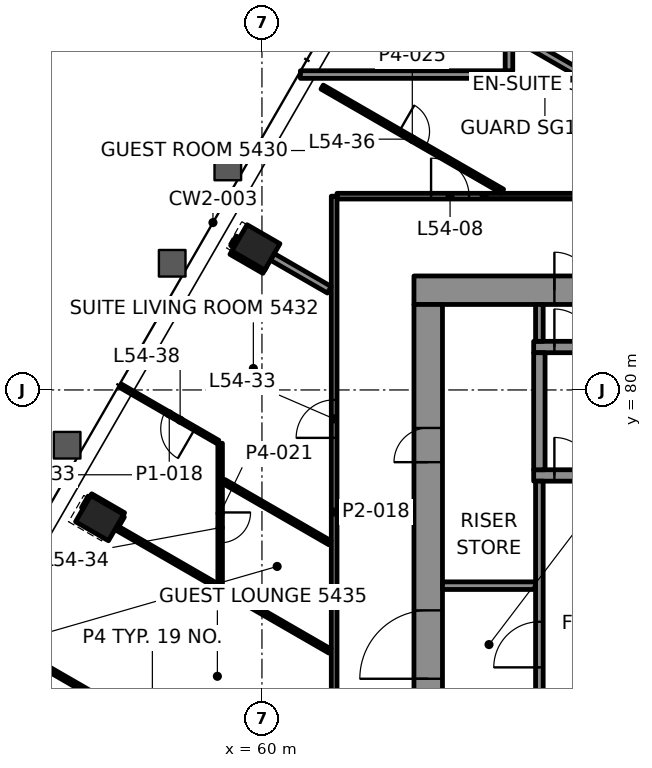
"""IFC4 building model, lengths in metres.
Left out: names, types, materials, properties, quantities, classifications, styles, units other than length and angle.
Written with IfcOpenShell. Run it as: python <this file> out.ifc"""

import sys

from ifc_helpers import new_model, si_unit, direction, frame, frame_2d, origin, origin_2d, place, context, subcontext, project, spatial, rectangle, hollow_rectangle, extrude, element, fill, save


model = new_model("IFC4")
c1 = context("Model", 3, precision=1e-05, world=origin(), true_north=direction((0.0, 1.0)))
c2 = subcontext(c1, "Body", "Model", "MODEL_VIEW")
j1 = project(units=[si_unit("LENGTHUNIT", "METRE"), si_unit("PLANEANGLEUNIT", "RADIAN")], contexts=[c1])
p1 = place(None, origin())
s1 = spatial("IfcSite", under=j1, at=p1, CompositionType="ELEMENT")
p2 = place(p1, origin())
s2 = spatial("IfcBuilding", under=s1, at=p2, CompositionType="ELEMENT")
p3 = place(p2, frame((0.0, 0.0, 229.9)))
s3 = spatial("IfcBuildingStorey", under=s2, at=p3, CompositionType="ELEMENT", Elevation=229.9)
for number, where, z_axis, x_axis in (
    (1, (59.841, 83.752, -0.0), (0.0, 0.0, 1.0), (-0.5, -0.866, 0.0)),
    (2, (55.728, 76.628, -0.0), (0.0, 0.0, 1.0), (-0.5, -0.866, 0.0)),
):
    element("IfcColumn", number, at=place(p3, frame(where, z_axis=z_axis, x_axis=x_axis)), inside=s3, PredefinedType="COLUMN", context=c2, shape_type="SweptSolid", body=[
        extrude(hollow_rectangle(XDim=0.8, YDim=1.0, WallThickness=0.05, at=origin_2d()), origin(), (0.0, 0.0, 1.0), 3.9),
    ])
p4 = place(p3, frame((64.0, 82.625, 0.0), z_axis=(0.0, 0.0, 1.0), x_axis=(1.0, 0.0, 0.0)))
e3 = element("IfcWall", 3, at=p4, inside=s3, PredefinedType="SHEAR", context=c2, shape_type="SweptSolid", body=[
    extrude(rectangle(XDim=22.0, YDim=0.75, at=frame_2d((11.0, 0.0))), origin(), (0.0, 0.0, 1.0), 3.7),
])
p5 = place(p4, frame((3.695, 0.0, 0.0)))
e4 = element("IfcOpeningElement", 4, at=p5, cuts=e3, PredefinedType="OPENING", context=c2, shape_type="SweptSolid", body=[
    extrude(rectangle(XDim=1.0, YDim=2.1, at=frame_2d((0.5, 1.05))), frame((0.0, 0.385, 0.0), z_axis=(0.0, -1.0, 0.0), x_axis=(1.0, 0.0, 0.0)), (0.0, 0.0, 1.0), 0.77),
])
p6 = place(p4, frame((17.505, 0.0, 0.0)))
e5 = element("IfcOpeningElement", 5, at=p6, cuts=e3, PredefinedType="OPENING", context=c2, shape_type="SweptSolid", body=[
    extrude(rectangle(XDim=1.0, YDim=2.1, at=frame_2d((0.5, 1.05))), frame((0.0, 0.385, 0.0), z_axis=(0.0, -1.0, 0.0), x_axis=(1.0, 0.0, 0.0)), (0.0, 0.0, 1.0), 0.77),
])
p7 = place(p4, frame((10.65, 0.0, 0.0)))
e6 = element("IfcOpeningElement", 6, at=p7, cuts=e3, PredefinedType="OPENING", context=c2, shape_type="SweptSolid", body=[
    extrude(rectangle(XDim=0.9, YDim=2.1, at=frame_2d((0.45, 1.05))), frame((0.0, 0.385, 0.0), z_axis=(0.0, -1.0, 0.0), x_axis=(1.0, 0.0, 0.0)), (0.0, 0.0, 1.0), 0.77),
])
p8 = place(p3, frame((64.375, 67.75, 0.0), z_axis=(0.0, 0.0, 1.0), x_axis=(0.0, 1.0, 0.0)))
e7 = element("IfcWall", 7, at=p8, inside=s3, PredefinedType="SHEAR", context=c2, shape_type="SweptSolid", body=[
    extrude(rectangle(XDim=14.5, YDim=0.75, at=frame_2d((7.25, 0.0))), origin(), (0.0, 0.0, 1.0), 3.7),
])
p9 = place(p8, frame((4.65, 0.0, 0.0)))
e8 = element("IfcOpeningElement", 8, at=p9, cuts=e7, PredefinedType="OPENING", context=c2, shape_type="SweptSolid", body=[
    extrude(rectangle(XDim=1.8, YDim=2.1, at=frame_2d((0.9, 1.05))), frame((0.0, 0.385, 0.0), z_axis=(0.0, -1.0, 0.0), x_axis=(1.0, 0.0, 0.0)), (0.0, 0.0, 1.0), 0.77),
])
p10 = place(p8, frame((2.55, 0.0, 0.0)))
e9 = element("IfcOpeningElement", 9, at=p10, cuts=e7, PredefinedType="OPENING", context=c2, shape_type="SweptSolid", body=[
    extrude(rectangle(XDim=0.9, YDim=2.1, at=frame_2d((0.45, 1.05))), frame((0.0, 0.385, 0.0), z_axis=(0.0, -1.0, 0.0), x_axis=(1.0, 0.0, 0.0)), (0.0, 0.0, 1.0), 0.77),
])
p11 = place(p8, frame((10.35, 0.0, 0.0)))
e10 = element("IfcOpeningElement", 10, at=p11, cuts=e7, PredefinedType="OPENING", context=c2, shape_type="SweptSolid", body=[
    extrude(rectangle(XDim=0.9, YDim=2.1, at=frame_2d((0.45, 1.05))), frame((0.0, 0.385, 0.0), z_axis=(0.0, -1.0, 0.0), x_axis=(1.0, 0.0, 0.0)), (0.0, 0.0, 1.0), 0.77),
])
p12 = place(p3, frame((67.15, 77.75, 0.0), z_axis=(0.0, 0.0, 1.0), x_axis=(1.0, 0.0, 0.0)))
e11 = element("IfcWall", 11, at=p12, inside=s3, PredefinedType="SHEAR", context=c2, shape_type="SweptSolid", body=[
    extrude(rectangle(XDim=17.45, YDim=0.3, at=frame_2d((8.725, 0.0))), origin(), (0.0, 0.0, 1.0), 3.7),
])
p13 = place(p12, frame((0.545, 0.0, 0.0)))
e12 = element("IfcOpeningElement", 12, at=p13, cuts=e11, PredefinedType="OPENING", context=c2, shape_type="SweptSolid", body=[
    extrude(rectangle(XDim=1.0, YDim=2.1, at=frame_2d((0.5, 1.05))), frame((0.0, 0.16, 0.0), z_axis=(0.0, -1.0, 0.0), x_axis=(1.0, 0.0, 0.0)), (0.0, 0.0, 1.0), 0.32),
])
p14 = place(p3, frame((67.15, 81.13, 0.0), z_axis=(0.0, 0.0, 1.0), x_axis=(1.0, 0.0, 0.0)))
e13 = element("IfcWall", 13, at=p14, inside=s3, PredefinedType="SHEAR", context=c2, shape_type="SweptSolid", body=[
    extrude(rectangle(XDim=6.91, YDim=0.3, at=frame_2d((3.455, 0.0))), origin(), (0.0, 0.0, 1.0), 3.7),
])
p15 = place(p14, frame((0.545, 0.0, 0.0)))
e14 = element("IfcOpeningElement", 14, at=p15, cuts=e13, PredefinedType="OPENING", context=c2, shape_type="SweptSolid", body=[
    extrude(rectangle(XDim=1.0, YDim=2.1, at=frame_2d((0.5, 1.05))), frame((0.0, 0.16, 0.0), z_axis=(0.0, -1.0, 0.0), x_axis=(1.0, 0.0, 0.0)), (0.0, 0.0, 1.0), 0.32),
])
p16 = place(p3, frame((67.3, 77.9, 0.0), z_axis=(0.0, 0.0, 1.0), x_axis=(0.0, 1.0, 0.0)))
e15 = element("IfcWall", 15, at=p16, inside=s3, PredefinedType="SHEAR", context=c2, shape_type="SweptSolid", body=[
    extrude(rectangle(XDim=3.08, YDim=0.3, at=frame_2d((1.54, 0.0))), origin(), (0.0, 0.0, 1.0), 3.7),
])
p17 = place(p3, frame((61.976, 85.1, 0.0), z_axis=(0.0, 0.0, 1.0), x_axis=(1.0, 0.0, 0.0)))
e16 = element("IfcWall", 16, at=p17, inside=s3, PredefinedType="PARTITIONING", context=c2, shape_type="SweptSolid", body=[
    extrude(rectangle(XDim=7.744, YDim=0.15, at=frame_2d((3.872, 0.0))), origin(), (0.0, 0.0, 1.0), 3.1),
])
p18 = place(p17, frame((2.475, 0.0, 0.0)))
e17 = element("IfcOpeningElement", 17, at=p18, cuts=e16, PredefinedType="OPENING", context=c2, shape_type="SweptSolid", body=[
    extrude(rectangle(XDim=1.0, YDim=2.1, at=frame_2d((0.5, 1.05))), frame((0.0, 0.085, 0.0), z_axis=(0.0, -1.0, 0.0), x_axis=(1.0, 0.0, 0.0)), (0.0, 0.0, 1.0), 0.17),
])
p19 = place(p3, frame((61.012, 88.3, 0.0), z_axis=(0.0, 0.0, 1.0), x_axis=(1.0, 0.0, 0.0)))
e18 = element("IfcWall", 18, at=p19, inside=s3, PredefinedType="PARTITIONING", context=c2, shape_type="SweptSolid", body=[
    extrude(rectangle(XDim=5.488, YDim=0.2, at=frame_2d((2.744, 0.0))), origin(), (0.0, 0.0, 1.0), 3.022),
])
p20 = place(p3, frame((56.192, 76.431, 0.0), z_axis=(0.0, 0.0, 1.0), x_axis=(0.500136839105, 0.865946385275, 0.0)))
e19 = element("IfcWall", 19, at=p20, inside=s3, PredefinedType="PARTITIONING", context=c2, shape_type="SweptSolid", body=[
    extrude(rectangle(XDim=0.289, YDim=0.1, at=frame_2d((0.145, 0.0))), origin(), (0.0, 0.0, 1.0), 3.1),
])
p21 = place(p3, frame((55.296, 76.879, 0.0), z_axis=(0.0, 0.0, 1.0), x_axis=(0.500126092966, 0.865952591736, 0.0)))
e20 = element("IfcWall", 20, at=p21, inside=s3, PredefinedType="PARTITIONING", context=c2, shape_type="SweptSolid", body=[
    extrude(rectangle(XDim=0.349, YDim=0.1, at=frame_2d((0.175, 0.0))), origin(), (0.0, 0.0, 1.0), 3.1),
])
p22 = place(p3, frame((59.263, 83.751, 0.0), z_axis=(0.0, 0.0, 1.0), x_axis=(0.499941024108, 0.866059450854, 0.0)))
e21 = element("IfcWall", 21, at=p22, inside=s3, PredefinedType="PARTITIONING", context=c2, shape_type="SweptSolid", body=[
    extrude(rectangle(XDim=0.29, YDim=0.2, at=frame_2d((0.145, 0.0))), origin(), (0.0, 0.0, 1.0), 3.1),
])
p23 = place(p3, frame((66.5, 88.4, 0.0), z_axis=(0.0, 0.0, 1.0), x_axis=(0.0, 1.0, 0.0)))
e22 = element("IfcWall", 22, at=p23, inside=s3, PredefinedType="PARTITIONING", context=c2, shape_type="SweptSolid", body=[
    extrude(rectangle(XDim=0.83, YDim=0.2, at=frame_2d((0.415, 0.0))), origin(), (0.0, 0.0, 1.0), 3.1),
])
p24 = place(p3, frame((61.9, 68.476, 0.0), z_axis=(0.0, 0.0, 1.0), x_axis=(0.0, 1.0, 0.0)))
e23 = element("IfcWall", 23, at=p24, inside=s3, PredefinedType="PARTITIONING", context=c2, shape_type="SweptSolid", body=[
    extrude(rectangle(XDim=16.624, YDim=0.15, at=frame_2d((8.312, 0.0))), origin(), (0.0, 0.0, 1.0), 3.1),
])
p25 = place(p24, frame((1.946, 0.0, 0.0)))
e24 = element("IfcOpeningElement", 24, at=p25, cuts=e23, PredefinedType="OPENING", context=c2, shape_type="SweptSolid", body=[
    extrude(rectangle(XDim=0.9, YDim=2.1, at=frame_2d((0.45, 1.05))), frame((0.0, 0.085, 0.0), z_axis=(0.0, -1.0, 0.0), x_axis=(1.0, 0.0, 0.0)), (0.0, 0.0, 1.0), 0.17),
])
p26 = place(p24, frame((10.263, 0.0, 0.0)))
e25 = element("IfcOpeningElement", 25, at=p26, cuts=e23, PredefinedType="OPENING", context=c2, shape_type="SweptSolid", body=[
    extrude(rectangle(XDim=1.0, YDim=2.1, at=frame_2d((0.5, 1.05))), frame((0.0, 0.085, 0.0), z_axis=(0.0, -1.0, 0.0), x_axis=(1.0, 0.0, 0.0)), (0.0, 0.0, 1.0), 0.17),
])
p27 = place(p3, frame((58.9, 78.596, 0.0), z_axis=(0.0, 0.0, 1.0), x_axis=(0.0, -1.0, 0.0)))
e26 = element("IfcWall", 26, at=p27, inside=s3, PredefinedType="PARTITIONING", context=c2, shape_type="SweptSolid", body=[
    extrude(rectangle(XDim=3.69, YDim=0.12, at=frame_2d((1.845, 0.0))), origin(), (0.0, 0.0, 1.0), 3.1),
])
p28 = place(p27, frame((1.82, 0.0, 0.0)))
e27 = element("IfcOpeningElement", 27, at=p28, cuts=e26, PredefinedType="OPENING", context=c2, shape_type="SweptSolid", body=[
    extrude(rectangle(XDim=0.8, YDim=2.1, at=frame_2d((0.4, 1.05))), frame((0.0, 0.07, 0.0), z_axis=(0.0, -1.0, 0.0), x_axis=(1.0, 0.0, 0.0)), (0.0, 0.0, 1.0), 0.14),
])
p29 = place(p3, frame((69.573, 87.631, 0.0), z_axis=(0.0, 0.0, 1.0), x_axis=(-0.866028616566, 0.499994435258, 0.0)))
e28 = element("IfcWall", 28, at=p29, inside=s3, PredefinedType="PARTITIONING", context=c2, shape_type="SweptSolid", body=[
    extrude(rectangle(XDim=3.548, YDim=0.2, at=frame_2d((1.774, 0.0))), origin(), (0.0, 0.0, 1.0), 3.1),
])
p30 = place(p3, frame((61.583, 87.97, 0.0), z_axis=(0.0, 0.0, 1.0), x_axis=(0.866027562125, -0.499996261625, 0.0)))
e29 = element("IfcWall", 29, at=p30, inside=s3, PredefinedType="PARTITIONING", context=c2, shape_type="SweptSolid", body=[
    extrude(rectangle(XDim=5.48, YDim=0.12, at=frame_2d((2.74, 0.0))), origin(), (0.0, 0.0, 1.0), 3.022),
])
p31 = place(p30, frame((2.34, 0.0, 0.0)))
e30 = element("IfcOpeningElement", 30, at=p31, cuts=e29, PredefinedType="OPENING", context=c2, shape_type="SweptSolid", body=[
    extrude(rectangle(XDim=0.8, YDim=2.1, at=frame_2d((0.4, 1.05))), frame((0.0, 0.07, 0.0), z_axis=(0.0, -1.0, 0.0), x_axis=(1.0, 0.0, 0.0)), (0.0, 0.0, 1.0), 0.14),
])
p32 = place(p3, frame((61.773, 82.637, 0.0), z_axis=(0.0, 0.0, 1.0), x_axis=(-0.866082241464, 0.499901541327, 0.0)))
e31 = element("IfcWall", 31, at=p32, inside=s3, PredefinedType="PARTITIONING", context=c2, shape_type="SweptSolid", body=[
    extrude(rectangle(XDim=1.731, YDim=0.2, at=frame_2d((0.865, 0.0))), origin(), (0.0, 0.0, 1.0), 3.1),
])
p33 = place(p3, frame((60.074, 83.156, 0.0), z_axis=(0.0, 0.0, 1.0), x_axis=(-0.866010750942, 0.50002537861, 0.0)))
e32 = element("IfcWall", 32, at=p33, inside=s3, PredefinedType="PARTITIONING", context=c2, shape_type="SweptSolid", body=[
    extrude(rectangle(XDim=1.0, YDim=0.2, at=frame_2d((0.5, 0.0))), origin(), (0.0, 0.0, 1.0), 3.022),
])
p34 = place(p3, frame((58.84, 78.632, 0.0), z_axis=(0.0, 0.0, 1.0), x_axis=(-0.866057572592, 0.49994427785, 0.0)))
e33 = element("IfcWall", 33, at=p34, inside=s3, PredefinedType="PARTITIONING", context=c2, shape_type="SweptSolid", body=[
    extrude(rectangle(XDim=2.953, YDim=0.1, at=frame_2d((1.477, 0.0))), origin(), (0.0, 0.0, 1.0), 3.022),
])
p35 = place(p34, frame((0.697, 0.0, 0.0)))
e34 = element("IfcOpeningElement", 34, at=p35, cuts=e33, PredefinedType="OPENING", context=c2, shape_type="SweptSolid", body=[
    extrude(rectangle(XDim=0.9, YDim=2.1, at=frame_2d((0.45, 1.05))), frame((0.0, 0.06, 0.0), z_axis=(0.0, -1.0, 0.0), x_axis=(1.0, 0.0, 0.0)), (0.0, 0.0, 1.0), 0.12),
])
p36 = place(p3, frame((61.79, 75.978, 0.0), z_axis=(0.0, 0.0, 1.0), x_axis=(-0.866033195618, 0.499986503906, 0.0)))
e35 = element("IfcWall", 35, at=p36, inside=s3, PredefinedType="PARTITIONING", context=c2, shape_type="SweptSolid", body=[
    extrude(rectangle(XDim=3.228, YDim=0.12, at=frame_2d((1.614, 0.0))), origin(), (0.0, 0.0, 1.0), 3.1),
])
p37 = place(p3, frame((56.361, 76.725, 0.0), z_axis=(0.0, 0.0, 1.0), x_axis=(-0.866039090965, 0.499976292358, 0.0)))
e36 = element("IfcWall", 36, at=p37, inside=s3, PredefinedType="PARTITIONING", context=c2, shape_type="SweptSolid", body=[
    extrude(rectangle(XDim=0.999, YDim=0.1, at=frame_2d((0.5, 0.0))), origin(), (0.0, 0.0, 1.0), 3.022),
])
p38 = place(p3, frame((61.79, 73.128, 0.0), z_axis=(0.0, 0.0, 1.0), x_axis=(-0.866022320763, 0.500005339912, 0.0)))
e37 = element("IfcWall", 37, at=p38, inside=s3, PredefinedType="PARTITIONING", context=c2, shape_type="SweptSolid", body=[
    extrude(rectangle(XDim=6.5, YDim=0.12, at=frame_2d((3.25, 0.0))), origin(), (0.0, 0.0, 1.0), 3.1),
])
p39 = place(p3, frame((61.652, 68.46, 0.0), z_axis=(0.0, 0.0, 1.0), x_axis=(-0.866025672267, 0.499999534974, 0.0)))
e38 = element("IfcWall", 38, at=p39, inside=s3, PredefinedType="PARTITIONING", context=c2, shape_type="SweptSolid", body=[
    extrude(rectangle(XDim=10.475, YDim=0.12, at=frame_2d((5.237, 0.0))), origin(), (0.0, 0.0, 1.0), 3.022),
])
p40 = place(p3, frame((64.75, 74.85, 0.0), z_axis=(0.0, 0.0, 1.0), x_axis=(1.0, 0.0, 0.0)))
e39 = element("IfcWall", 39, at=p40, inside=s3, PredefinedType="PARTITIONING", context=c2, shape_type="SweptSolid", body=[
    extrude(rectangle(XDim=2.45, YDim=0.2, at=frame_2d((1.225, 0.0))), origin(), (0.0, 0.0, 1.0), 3.7),
])
p41 = place(p3, frame((67.3, 71.85, 0.0), z_axis=(0.0, 0.0, 1.0), x_axis=(0.0, 1.0, 0.0)))
e40 = element("IfcWall", 40, at=p41, inside=s3, PredefinedType="PARTITIONING", context=c2, shape_type="SweptSolid", body=[
    extrude(rectangle(XDim=5.75, YDim=0.2, at=frame_2d((2.875, 0.0))), origin(), (0.0, 0.0, 1.0), 3.7),
])
p42 = place(p41, frame((0.85, 0.0, 0.0)))
e41 = element("IfcOpeningElement", 41, at=p42, cuts=e40, PredefinedType="OPENING", context=c2, shape_type="SweptSolid", body=[
    extrude(rectangle(XDim=1.2, YDim=2.1, at=frame_2d((0.6, 1.05))), frame((0.0, 0.11, 0.0), z_axis=(0.0, -1.0, 0.0), x_axis=(1.0, 0.0, 0.0)), (0.0, 0.0, 1.0), 0.22),
])
p43 = place(p3, frame((67.3, 81.28, 0.0), z_axis=(0.0, 0.0, 1.0), x_axis=(0.0, 1.0, 0.0)))
e42 = element("IfcWall", 42, at=p43, inside=s3, PredefinedType="PARTITIONING", context=c2, shape_type="SweptSolid", body=[
    extrude(rectangle(XDim=0.97, YDim=0.2, at=frame_2d((0.485, 0.0))), origin(), (0.0, 0.0, 1.0), 3.7),
])
p44 = place(p18, origin())
e43 = element("IfcDoor", 43, at=p44, inside=s3, OperationType="SINGLE_SWING_LEFT", PredefinedType="DOOR", context=c2, shape_type="SweptSolid", body=[
    extrude(rectangle(XDim=1.0, YDim=2.1, at=frame_2d((0.5, 1.05))), frame((0.0, 0.025, 0.0), z_axis=(0.0, -1.0, 0.0), x_axis=(1.0, 0.0, 0.0)), (0.0, 0.0, 1.0), 0.05),
])
fill(e17, e43)
p45 = place(p26, origin())
e44 = element("IfcDoor", 44, at=p45, inside=s3, OperationType="SINGLE_SWING_LEFT", PredefinedType="DOOR", context=c2, shape_type="SweptSolid", body=[
    extrude(rectangle(XDim=1.0, YDim=2.1, at=frame_2d((0.5, 1.05))), frame((0.0, 0.025, 0.0), z_axis=(0.0, -1.0, 0.0), x_axis=(1.0, 0.0, 0.0)), (0.0, 0.0, 1.0), 0.05),
])
fill(e25, e44)
p46 = place(p28, origin())
e45 = element("IfcDoor", 45, at=p46, inside=s3, OperationType="SINGLE_SWING_RIGHT", PredefinedType="DOOR", context=c2, shape_type="SweptSolid", body=[
    extrude(rectangle(XDim=0.8, YDim=2.1, at=frame_2d((0.4, 1.05))), frame((0.0, 0.025, 0.0), z_axis=(0.0, -1.0, 0.0), x_axis=(1.0, 0.0, 0.0)), (0.0, 0.0, 1.0), 0.05),
])
fill(e27, e45)
p47 = place(p31, origin())
e46 = element("IfcDoor", 46, at=p47, inside=s3, OperationType="SINGLE_SWING_LEFT", PredefinedType="DOOR", context=c2, shape_type="SweptSolid", body=[
    extrude(rectangle(XDim=0.8, YDim=2.1, at=frame_2d((0.4, 1.05))), frame((0.0, 0.025, 0.0), z_axis=(0.0, -1.0, 0.0), x_axis=(1.0, 0.0, 0.0)), (0.0, 0.0, 1.0), 0.05),
])
fill(e30, e46)
p48 = place(p35, origin())
e47 = element("IfcDoor", 47, at=p48, inside=s3, OperationType="SINGLE_SWING_RIGHT", PredefinedType="DOOR", context=c2, shape_type="SweptSolid", body=[
    extrude(rectangle(XDim=0.9, YDim=2.1, at=frame_2d((0.45, 1.05))), frame((0.0, 0.025, 0.0), z_axis=(0.0, -1.0, 0.0), x_axis=(1.0, 0.0, 0.0)), (0.0, 0.0, 1.0), 0.05),
])
fill(e34, e47)
p49 = place(p13, origin())
e48 = element("IfcDoor", 48, at=p49, inside=s3, OperationType="SINGLE_SWING_LEFT", PredefinedType="DOOR", context=c2, shape_type="SweptSolid", body=[
    extrude(rectangle(XDim=1.0, YDim=2.1, at=frame_2d((0.5, 1.05))), frame((0.0, 0.025, 0.0), z_axis=(0.0, -1.0, 0.0), x_axis=(1.0, 0.0, 0.0)), (0.0, 0.0, 1.0), 0.05),
])
fill(e12, e48)
p50 = place(p15, origin())
e49 = element("IfcDoor", 49, at=p50, inside=s3, OperationType="SINGLE_SWING_RIGHT", PredefinedType="DOOR", context=c2, shape_type="SweptSolid", body=[
    extrude(rectangle(XDim=1.0, YDim=2.1, at=frame_2d((0.5, 1.05))), frame((0.0, 0.025, 0.0), z_axis=(0.0, -1.0, 0.0), x_axis=(1.0, 0.0, 0.0)), (0.0, 0.0, 1.0), 0.05),
])
fill(e14, e49)
p51 = place(p5, origin())
e50 = element("IfcDoor", 50, at=p51, inside=s3, OperationType="SINGLE_SWING_LEFT", PredefinedType="DOOR", context=c2, shape_type="SweptSolid", body=[
    extrude(rectangle(XDim=1.0, YDim=2.1, at=frame_2d((0.5, 1.05))), frame((0.0, 0.095, 0.0), z_axis=(0.0, -1.0, 0.0), x_axis=(1.0, 0.0, 0.0)), (0.0, 0.0, 1.0), 0.19),
])
fill(e4, e50)
p52 = place(p42, origin())
e51 = element("IfcDoor", 51, at=p52, inside=s3, OperationType="SINGLE_SWING_RIGHT", PredefinedType="DOOR", context=c2, shape_type="SweptSolid", body=[
    extrude(rectangle(XDim=1.2, YDim=2.1, at=frame_2d((0.6, 1.05))), frame((0.0, 0.025, 0.0), z_axis=(0.0, -1.0, 0.0), x_axis=(1.0, 0.0, 0.0)), (0.0, 0.0, 1.0), 0.05),
])
fill(e41, e51)
p53 = place(p9, origin())
e52 = element("IfcDoor", 52, at=p53, inside=s3, OperationType="SINGLE_SWING_LEFT", PredefinedType="DOOR", context=c2, shape_type="SweptSolid", body=[
    extrude(rectangle(XDim=1.8, YDim=2.1, at=frame_2d((0.9, 1.05))), frame((0.0, 0.095, 0.0), z_axis=(0.0, -1.0, 0.0), x_axis=(1.0, 0.0, 0.0)), (0.0, 0.0, 1.0), 0.19),
])
fill(e8, e52)
p54 = place(p11, origin())
e53 = element("IfcDoor", 53, at=p54, inside=s3, OperationType="SINGLE_SWING_RIGHT", PredefinedType="DOOR", context=c2, shape_type="SweptSolid", body=[
    extrude(rectangle(XDim=0.9, YDim=2.1, at=frame_2d((0.45, 1.05))), frame((0.0, 0.095, 0.0), z_axis=(0.0, -1.0, 0.0), x_axis=(1.0, 0.0, 0.0)), (0.0, 0.0, 1.0), 0.19),
])
fill(e10, e53)
save(model, sys.argv[1])
